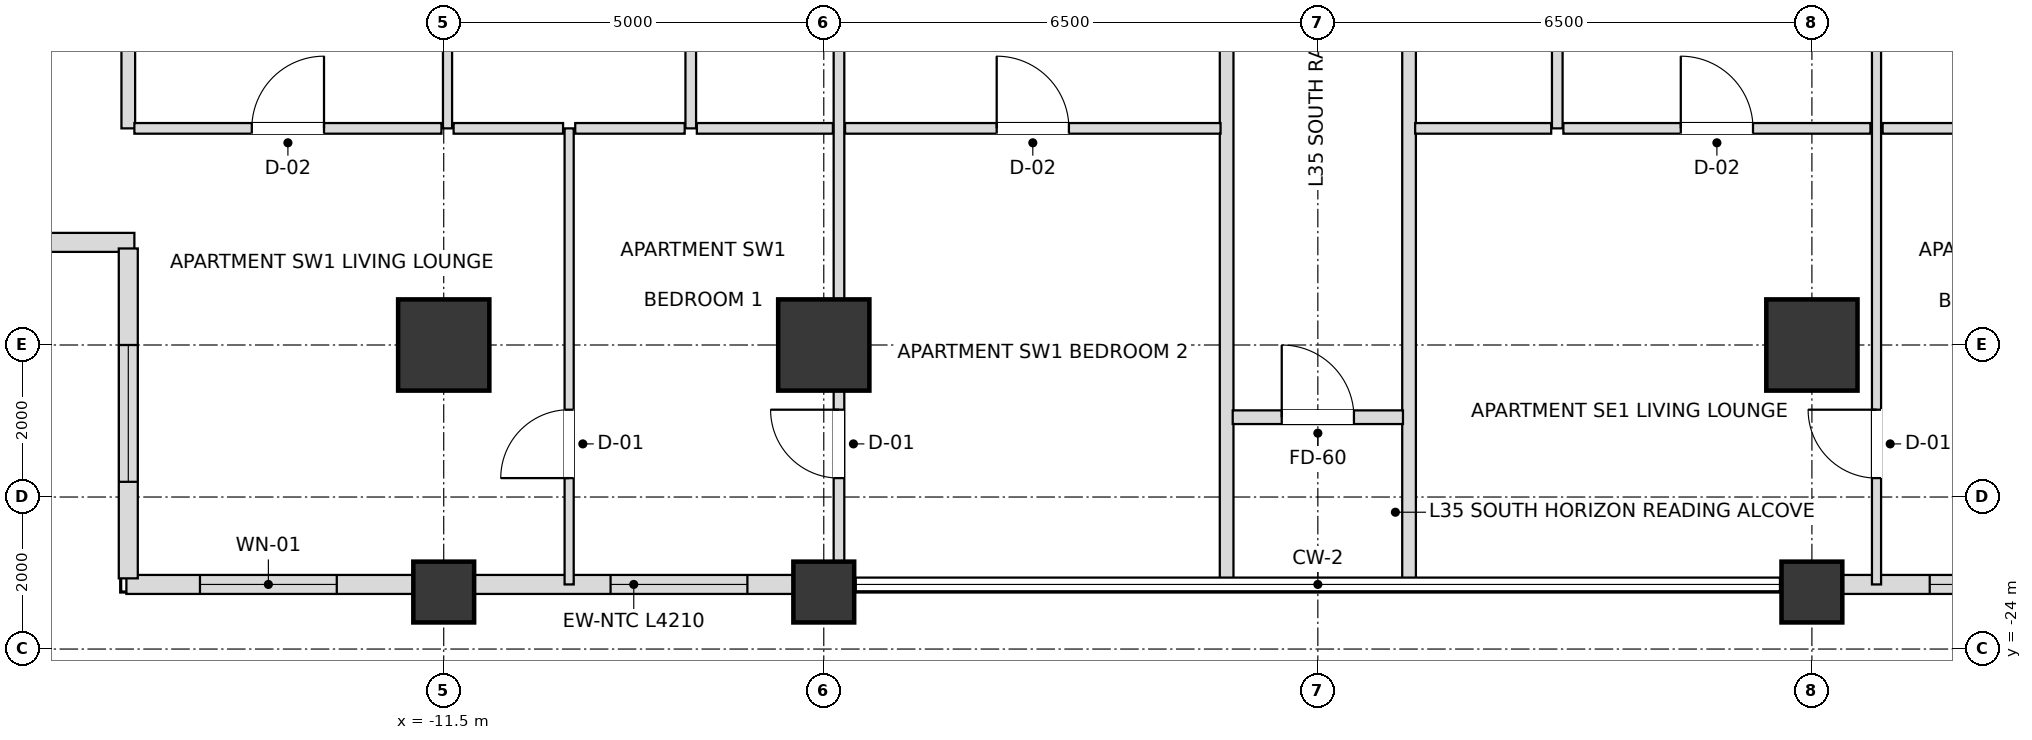
"""IFC4 building model, lengths in metres.
Left out: names, types, materials, properties, quantities, classifications, styles, units other than length and angle.
Written with IfcOpenShell. Run it as: python <this file> out.ifc"""

import sys

from ifc_helpers import new_model, si_unit, direction, frame, frame_2d, origin, origin_2d, place, context, subcontext, project, spatial, rectangle, extrude, element, fill, save


model = new_model("IFC4")
c1 = context("Model", 3, precision=1e-05, world=origin(), true_north=direction((0.0, 1.0)))
c2 = subcontext(c1, "Body", "Model", "MODEL_VIEW")
j1 = project(units=[si_unit("LENGTHUNIT", "METRE"), si_unit("PLANEANGLEUNIT", "RADIAN")], contexts=[c1])
p1 = place(None, origin())
s1 = spatial("IfcSite", under=j1, at=p1, CompositionType="ELEMENT")
p2 = place(p1, origin())
s2 = spatial("IfcBuilding", under=s1, at=p2, CompositionType="ELEMENT")
p3 = place(p2, frame((0.0, 0.0, 140.4)))
s3 = spatial("IfcBuildingStorey", under=s2, at=p3, CompositionType="ELEMENT", Elevation=140.4)
for number, where, z_axis, x_axis in (
    (1, (-11.5, -20.0, 0.0), (0.0, 0.0, 1.0), (1.0, 0.0, 0.0)),
    (2, (-6.5, -20.0, 0.0), (0.0, 0.0, 1.0), (1.0, 0.0, 0.0)),
    (3, (6.5, -20.0, 0.0), (0.0, 0.0, 1.0), (1.0, 0.0, 0.0)),
):
    element("IfcColumn", number, at=place(p3, frame(where, z_axis=z_axis, x_axis=x_axis)), inside=s3, PredefinedType="USERDEFINED", context=c2, shape_type="SweptSolid", body=[
        extrude(rectangle(XDim=1.2, YDim=1.2, at=origin_2d()), origin(), (0.0, 0.0, 1.0), 3.6),
    ])
for number, where, z_axis, x_axis in (
    (4, (-11.5, -23.25, 0.0), (0.0, 0.0, 1.0), (1.0, 0.0, 0.0)),
    (5, (-6.5, -23.25, 0.0), (0.0, 0.0, 1.0), (1.0, 0.0, 0.0)),
    (6, (6.5, -23.25, 0.0), (0.0, 0.0, 1.0), (1.0, 0.0, 0.0)),
):
    element("IfcColumn", number, at=place(p3, frame(where, z_axis=z_axis, x_axis=x_axis)), inside=s3, PredefinedType="COLUMN", context=c2, shape_type="SweptSolid", body=[
        extrude(rectangle(XDim=0.8, YDim=0.8, at=origin_2d()), origin(), (0.0, 0.0, 1.0), 3.6),
    ])
p4 = place(p3, frame((-15.675, -23.15, 0.0), z_axis=(0.0, 0.0, 1.0), x_axis=(1.0, 0.0, 0.0)))
e7 = element("IfcWall", 7, at=p4, inside=s3, PredefinedType="SOLIDWALL", context=c2, shape_type="SweptSolid", body=[
    extrude(rectangle(XDim=3.78, YDim=0.25, at=frame_2d((1.89, 0.0))), origin(), (0.0, 0.0, 1.0), 2.736),
])
p5 = place(p4, frame((0.968, 0.0, 0.72)))
e8 = element("IfcOpeningElement", 8, at=p5, cuts=e7, PredefinedType="OPENING", context=c2, shape_type="SweptSolid", body=[
    extrude(rectangle(XDim=1.8, YDim=1.68, at=frame_2d((0.9, 0.84))), frame((0.0, 0.135, 0.0), z_axis=(0.0, -1.0, 0.0), x_axis=(1.0, 0.0, 0.0)), (0.0, 0.0, 1.0), 0.27),
])
p6 = place(p3, frame((-11.105, -23.15, 0.0), z_axis=(0.0, 0.0, 1.0), x_axis=(1.0, 0.0, 0.0)))
e9 = element("IfcWall", 9, at=p6, inside=s3, PredefinedType="SOLIDWALL", context=c2, shape_type="SweptSolid", body=[
    extrude(rectangle(XDim=4.21, YDim=0.25, at=frame_2d((2.105, 0.0))), origin(), (0.0, 0.0, 1.0), 2.736),
])
p7 = place(p6, frame((1.8, 0.0, 0.72)))
e10 = element("IfcOpeningElement", 10, at=p7, cuts=e9, PredefinedType="OPENING", context=c2, shape_type="SweptSolid", body=[
    extrude(rectangle(XDim=1.8, YDim=1.68, at=frame_2d((0.9, 0.84))), frame((0.0, 0.135, 0.0), z_axis=(0.0, -1.0, 0.0), x_axis=(1.0, 0.0, 0.0)), (0.0, 0.0, 1.0), 0.27),
])
p8 = place(p3, frame((6.895, -23.15, 0.0), z_axis=(0.0, 0.0, 1.0), x_axis=(1.0, 0.0, 0.0)))
e11 = element("IfcWall", 11, at=p8, inside=s3, PredefinedType="SOLIDWALL", context=c2, shape_type="SweptSolid", body=[
    extrude(rectangle(XDim=4.21, YDim=0.25, at=frame_2d((2.105, 0.0))), origin(), (0.0, 0.0, 1.0), 2.736),
])
p9 = place(p8, frame((1.155, 0.0, 0.72)))
e12 = element("IfcOpeningElement", 12, at=p9, cuts=e11, PredefinedType="OPENING", context=c2, shape_type="SweptSolid", body=[
    extrude(rectangle(XDim=1.8, YDim=1.68, at=frame_2d((0.9, 0.84))), frame((0.0, 0.135, 0.0), z_axis=(0.0, -1.0, 0.0), x_axis=(1.0, 0.0, 0.0)), (0.0, 0.0, 1.0), 0.27),
])
p10 = place(p3, frame((-20.23, -18.65, 0.0), z_axis=(0.0, 0.0, 1.0), x_axis=(1.0, 0.0, 0.0)))
e13 = element("IfcWall", 13, at=p10, inside=s3, PredefinedType="SOLIDWALL", context=c2, shape_type="SweptSolid", body=[
    extrude(rectangle(XDim=4.66, YDim=0.25, at=frame_2d((2.33, 0.0))), origin(), (0.0, 0.0, 1.0), 2.736),
])
p11 = place(p10, frame((1.43, 0.0, 0.72)))
e14 = element("IfcOpeningElement", 14, at=p11, cuts=e13, PredefinedType="OPENING", context=c2, shape_type="SweptSolid", body=[
    extrude(rectangle(XDim=1.8, YDim=1.68, at=frame_2d((0.9, 0.84))), frame((0.0, 0.135, 0.0), z_axis=(0.0, -1.0, 0.0), x_axis=(1.0, 0.0, 0.0)), (0.0, 0.0, 1.0), 0.27),
])
p12 = place(p3, frame((-15.65, -18.73, 0.0), z_axis=(0.0, 0.0, 1.0), x_axis=(0.0, -1.0, 0.0)))
e15 = element("IfcWall", 15, at=p12, inside=s3, PredefinedType="SOLIDWALL", context=c2, shape_type="SweptSolid", body=[
    extrude(rectangle(XDim=4.34, YDim=0.25, at=frame_2d((2.17, 0.0))), origin(), (0.0, 0.0, 1.0), 2.736),
])
p13 = place(p12, frame((1.27, 0.0, 0.72)))
e16 = element("IfcOpeningElement", 16, at=p13, cuts=e15, PredefinedType="OPENING", context=c2, shape_type="SweptSolid", body=[
    extrude(rectangle(XDim=1.8, YDim=1.68, at=frame_2d((0.9, 0.84))), frame((0.0, 0.135, 0.0), z_axis=(0.0, -1.0, 0.0), x_axis=(1.0, 0.0, 0.0)), (0.0, 0.0, 1.0), 0.27),
])
p14 = place(p3, frame((-15.65, -17.15, 0.0), z_axis=(0.0, 0.0, 1.0), x_axis=(0.0, 1.0, 0.0)))
e17 = element("IfcWall", 17, at=p14, inside=s3, PredefinedType="PARTITIONING", context=c2, shape_type="SweptSolid", body=[
    extrude(rectangle(XDim=7.35, YDim=0.18, at=frame_2d((3.675, 0.0))), origin(), (0.0, 0.0, 1.0), 2.736),
])
p15 = place(p3, frame((-11.45, -17.15, 0.0), z_axis=(0.0, 0.0, 1.0), x_axis=(0.0, 1.0, 0.0)))
e18 = element("IfcWall", 18, at=p15, inside=s3, PredefinedType="PARTITIONING", context=c2, shape_type="SweptSolid", body=[
    extrude(rectangle(XDim=7.35, YDim=0.12, at=frame_2d((3.675, 0.0))), origin(), (0.0, 0.0, 1.0), 2.736),
])
p16 = place(p15, frame((2.687, 0.0, 0.0)))
e19 = element("IfcOpeningElement", 19, at=p16, cuts=e18, PredefinedType="OPENING", context=c2, shape_type="SweptSolid", body=[
    extrude(rectangle(XDim=0.95, YDim=2.1, at=frame_2d((0.475, 1.05))), frame((0.0, 0.07, 0.0), z_axis=(0.0, -1.0, 0.0), x_axis=(1.0, 0.0, 0.0)), (0.0, 0.0, 1.0), 0.14),
])
p17 = place(p3, frame((-9.85, -23.15, 0.0), z_axis=(0.0, 0.0, 1.0), x_axis=(0.0, 1.0, 0.0)))
e20 = element("IfcWall", 20, at=p17, inside=s3, PredefinedType="PARTITIONING", context=c2, shape_type="SweptSolid", body=[
    extrude(rectangle(XDim=6.0, YDim=0.12, at=frame_2d((3.0, 0.0))), origin(), (0.0, 0.0, 1.0), 2.816),
])
p18 = place(p17, frame((1.399, 0.0, 0.0)))
e21 = element("IfcOpeningElement", 21, at=p18, cuts=e20, PredefinedType="OPENING", context=c2, shape_type="SweptSolid", body=[
    extrude(rectangle(XDim=0.9, YDim=2.1, at=frame_2d((0.45, 1.05))), frame((0.0, 0.07, 0.0), z_axis=(0.0, -1.0, 0.0), x_axis=(1.0, 0.0, 0.0)), (0.0, 0.0, 1.0), 0.14),
])
p19 = place(p3, frame((-8.25, -17.15, 0.0), z_axis=(0.0, 0.0, 1.0), x_axis=(0.0, 1.0, 0.0)))
e22 = element("IfcWall", 22, at=p19, inside=s3, PredefinedType="PARTITIONING", context=c2, shape_type="SweptSolid", body=[
    extrude(rectangle(XDim=7.35, YDim=0.14, at=frame_2d((3.675, 0.0))), origin(), (0.0, 0.0, 1.0), 2.816),
])
p20 = place(p19, frame((3.23, 0.0, 0.0)))
e23 = element("IfcOpeningElement", 23, at=p20, cuts=e22, PredefinedType="OPENING", context=c2, shape_type="SweptSolid", body=[
    extrude(rectangle(XDim=0.9, YDim=2.1, at=frame_2d((0.45, 1.05))), frame((0.0, 0.08, 0.0), z_axis=(0.0, -1.0, 0.0), x_axis=(1.0, 0.0, 0.0)), (0.0, 0.0, 1.0), 0.16),
])
p21 = place(p3, frame((-6.3, -23.15, 0.0), z_axis=(0.0, 0.0, 1.0), x_axis=(0.0, 1.0, 0.0)))
e24 = element("IfcWall", 24, at=p21, inside=s3, PredefinedType="PARTITIONING", context=c2, shape_type="SweptSolid", body=[
    extrude(rectangle(XDim=13.35, YDim=0.14, at=frame_2d((6.675, 0.0))), origin(), (0.0, 0.0, 1.0), 2.816),
])
p22 = place(p21, frame((1.399, 0.0, 0.0)))
e25 = element("IfcOpeningElement", 25, at=p22, cuts=e24, PredefinedType="OPENING", context=c2, shape_type="SweptSolid", body=[
    extrude(rectangle(XDim=0.9, YDim=2.1, at=frame_2d((0.45, 1.05))), frame((0.0, 0.08, 0.0), z_axis=(0.0, -1.0, 0.0), x_axis=(1.0, 0.0, 0.0)), (0.0, 0.0, 1.0), 0.16),
])
for number, where, z_axis, x_axis in (
    (26, (-1.2, -23.15, 0.0), (0.0, 0.0, 1.0), (0.0, 1.0, 0.0)),
    (27, (1.2, -23.15, 0.0), (0.0, 0.0, 1.0), (0.0, 1.0, 0.0)),
):
    element("IfcWall", number, at=place(p3, frame(where, z_axis=z_axis, x_axis=x_axis)), inside=s3, PredefinedType="PARTITIONING", context=c2, shape_type="SweptSolid", body=[
        extrude(rectangle(XDim=13.35, YDim=0.18, at=frame_2d((6.675, 0.0))), origin(), (0.0, 0.0, 1.0), 2.816),
    ])
p23 = place(p3, frame((3.15, -17.15, 0.0), z_axis=(0.0, 0.0, 1.0), x_axis=(0.0, 1.0, 0.0)))
e28 = element("IfcWall", 28, at=p23, inside=s3, PredefinedType="PARTITIONING", context=c2, shape_type="SweptSolid", body=[
    extrude(rectangle(XDim=7.35, YDim=0.14, at=frame_2d((3.675, 0.0))), origin(), (0.0, 0.0, 1.0), 3.38),
])
p24 = place(p23, frame((3.23, 0.0, 0.0)))
e29 = element("IfcOpeningElement", 29, at=p24, cuts=e28, PredefinedType="OPENING", context=c2, shape_type="SweptSolid", body=[
    extrude(rectangle(XDim=0.9, YDim=2.1, at=frame_2d((0.45, 1.05))), frame((0.0, 0.08, 0.0), z_axis=(0.0, -1.0, 0.0), x_axis=(1.0, 0.0, 0.0)), (0.0, 0.0, 1.0), 0.16),
])
p25 = place(p3, frame((7.35, -23.15, 0.0), z_axis=(0.0, 0.0, 1.0), x_axis=(0.0, 1.0, 0.0)))
e30 = element("IfcWall", 30, at=p25, inside=s3, PredefinedType="PARTITIONING", context=c2, shape_type="SweptSolid", body=[
    extrude(rectangle(XDim=13.35, YDim=0.12, at=frame_2d((6.675, 0.0))), origin(), (0.0, 0.0, 1.0), 2.816),
])
p26 = place(p25, frame((9.205, 0.0, 0.0)))
e31 = element("IfcOpeningElement", 31, at=p26, cuts=e30, PredefinedType="OPENING", context=c2, shape_type="SweptSolid", body=[
    extrude(rectangle(XDim=0.95, YDim=2.1, at=frame_2d((0.475, 1.05))), frame((0.0, 0.07, 0.0), z_axis=(0.0, -1.0, 0.0), x_axis=(1.0, 0.0, 0.0)), (0.0, 0.0, 1.0), 0.14),
])
p27 = place(p25, frame((1.399, 0.0, 0.0)))
e32 = element("IfcOpeningElement", 32, at=p27, cuts=e30, PredefinedType="OPENING", context=c2, shape_type="SweptSolid", body=[
    extrude(rectangle(XDim=0.9, YDim=2.1, at=frame_2d((0.45, 1.05))), frame((0.0, 0.07, 0.0), z_axis=(0.0, -1.0, 0.0), x_axis=(1.0, 0.0, 0.0)), (0.0, 0.0, 1.0), 0.14),
])
p28 = place(p3, frame((-1.12, -20.95, 0.0), z_axis=(0.0, 0.0, 1.0), x_axis=(1.0, 0.0, 0.0)))
e33 = element("IfcWall", 33, at=p28, inside=s3, PredefinedType="PARTITIONING", context=c2, shape_type="SweptSolid", body=[
    extrude(rectangle(XDim=2.24, YDim=0.18, at=frame_2d((1.12, 0.0))), origin(), (0.0, 0.0, 1.0), 3.38),
])
p29 = place(p28, frame((0.645, 0.0, 0.0)))
e34 = element("IfcOpeningElement", 34, at=p29, cuts=e33, PredefinedType="OPENING", context=c2, shape_type="SweptSolid", body=[
    extrude(rectangle(XDim=0.95, YDim=2.15, at=frame_2d((0.475, 1.075))), frame((0.0, 0.1, 0.0), z_axis=(0.0, -1.0, 0.0), x_axis=(1.0, 0.0, 0.0)), (0.0, 0.0, 1.0), 0.2),
])
p30 = place(p3, frame((-15.57, -17.15, 0.0), z_axis=(0.0, 0.0, 1.0), x_axis=(1.0, 0.0, 0.0)))
e35 = element("IfcWall", 35, at=p30, inside=s3, PredefinedType="PARTITIONING", context=c2, shape_type="SweptSolid", body=[
    extrude(rectangle(XDim=4.04, YDim=0.14, at=frame_2d((2.02, 0.0))), origin(), (0.0, 0.0, 1.0), 2.736),
])
p31 = place(p30, frame((1.545, 0.0, 0.0)))
e36 = element("IfcOpeningElement", 36, at=p31, cuts=e35, PredefinedType="OPENING", context=c2, shape_type="SweptSolid", body=[
    extrude(rectangle(XDim=0.95, YDim=2.1, at=frame_2d((0.475, 1.05))), frame((0.0, 0.08, 0.0), z_axis=(0.0, -1.0, 0.0), x_axis=(1.0, 0.0, 0.0)), (0.0, 0.0, 1.0), 0.16),
])
p32 = place(p3, frame((-11.37, -17.15, 0.0), z_axis=(0.0, 0.0, 1.0), x_axis=(1.0, 0.0, 0.0)))
e37 = element("IfcWall", 37, at=p32, inside=s3, PredefinedType="PARTITIONING", context=c2, shape_type="SweptSolid", body=[
    extrude(rectangle(XDim=1.44, YDim=0.14, at=frame_2d((0.72, 0.0))), origin(), (0.0, 0.0, 1.0), 3.38),
])
p33 = place(p3, frame((-9.77, -17.15, 0.0), z_axis=(0.0, 0.0, 1.0), x_axis=(1.0, 0.0, 0.0)))
e38 = element("IfcWall", 38, at=p33, inside=s3, PredefinedType="PARTITIONING", context=c2, shape_type="SweptSolid", body=[
    extrude(rectangle(XDim=1.44, YDim=0.14, at=frame_2d((0.72, 0.0))), origin(), (0.0, 0.0, 1.0), 3.38),
])
p34 = place(p3, frame((-8.17, -17.15, 0.0), z_axis=(0.0, 0.0, 1.0), x_axis=(1.0, 0.0, 0.0)))
e39 = element("IfcWall", 39, at=p34, inside=s3, PredefinedType="PARTITIONING", context=c2, shape_type="SweptSolid", body=[
    extrude(rectangle(XDim=1.79, YDim=0.14, at=frame_2d((0.895, 0.0))), origin(), (0.0, 0.0, 1.0), 2.816),
])
p35 = place(p3, frame((-6.22, -17.15, 0.0), z_axis=(0.0, 0.0, 1.0), x_axis=(1.0, 0.0, 0.0)))
e40 = element("IfcWall", 40, at=p35, inside=s3, PredefinedType="PARTITIONING", context=c2, shape_type="SweptSolid", body=[
    extrude(rectangle(XDim=4.94, YDim=0.14, at=frame_2d((2.47, 0.0))), origin(), (0.0, 0.0, 1.0), 3.38),
])
p36 = place(p35, frame((1.995, 0.0, 0.0)))
e41 = element("IfcOpeningElement", 41, at=p36, cuts=e40, PredefinedType="OPENING", context=c2, shape_type="SweptSolid", body=[
    extrude(rectangle(XDim=0.95, YDim=2.1, at=frame_2d((0.475, 1.05))), frame((0.0, 0.08, 0.0), z_axis=(0.0, -1.0, 0.0), x_axis=(1.0, 0.0, 0.0)), (0.0, 0.0, 1.0), 0.16),
])
p37 = place(p3, frame((1.28, -17.15, 0.0), z_axis=(0.0, 0.0, 1.0), x_axis=(1.0, 0.0, 0.0)))
e42 = element("IfcWall", 42, at=p37, inside=s3, PredefinedType="PARTITIONING", context=c2, shape_type="SweptSolid", body=[
    extrude(rectangle(XDim=1.79, YDim=0.14, at=frame_2d((0.895, 0.0))), origin(), (0.0, 0.0, 1.0), 3.38),
])
p38 = place(p3, frame((3.23, -17.15, 0.0), z_axis=(0.0, 0.0, 1.0), x_axis=(1.0, 0.0, 0.0)))
e43 = element("IfcWall", 43, at=p38, inside=s3, PredefinedType="PARTITIONING", context=c2, shape_type="SweptSolid", body=[
    extrude(rectangle(XDim=4.04, YDim=0.14, at=frame_2d((2.02, 0.0))), origin(), (0.0, 0.0, 1.0), 2.816),
])
p39 = place(p38, frame((1.545, 0.0, 0.0)))
e44 = element("IfcOpeningElement", 44, at=p39, cuts=e43, PredefinedType="OPENING", context=c2, shape_type="SweptSolid", body=[
    extrude(rectangle(XDim=0.95, YDim=2.1, at=frame_2d((0.475, 1.05))), frame((0.0, 0.08, 0.0), z_axis=(0.0, -1.0, 0.0), x_axis=(1.0, 0.0, 0.0)), (0.0, 0.0, 1.0), 0.16),
])
p40 = place(p3, frame((7.43, -17.15, 0.0), z_axis=(0.0, 0.0, 1.0), x_axis=(1.0, 0.0, 0.0)))
e45 = element("IfcWall", 45, at=p40, inside=s3, PredefinedType="PARTITIONING", context=c2, shape_type="SweptSolid", body=[
    extrude(rectangle(XDim=3.04, YDim=0.14, at=frame_2d((1.52, 0.0))), origin(), (0.0, 0.0, 1.0), 3.38),
])
p41 = place(p5, origin())
e46 = element("IfcWindow", 46, at=p41, inside=s3, PartitioningType="SINGLE_PANEL", PredefinedType="WINDOW", context=c2, shape_type="SweptSolid", body=[
    extrude(rectangle(XDim=1.8, YDim=1.68, at=frame_2d((0.9, 0.84))), frame((0.0, 0.03, 0.0), z_axis=(0.0, -1.0, 0.0), x_axis=(1.0, 0.0, 0.0)), (0.0, 0.0, 1.0), 0.06),
])
fill(e8, e46)
p42 = place(p7, origin())
e47 = element("IfcWindow", 47, at=p42, inside=s3, PartitioningType="SINGLE_PANEL", PredefinedType="WINDOW", context=c2, shape_type="SweptSolid", body=[
    extrude(rectangle(XDim=1.8, YDim=1.68, at=frame_2d((0.9, 0.84))), frame((0.0, 0.03, 0.0), z_axis=(0.0, -1.0, 0.0), x_axis=(1.0, 0.0, 0.0)), (0.0, 0.0, 1.0), 0.06),
])
fill(e10, e47)
p43 = place(p9, origin())
e48 = element("IfcWindow", 48, at=p43, inside=s3, PartitioningType="SINGLE_PANEL", PredefinedType="WINDOW", context=c2, shape_type="SweptSolid", body=[
    extrude(rectangle(XDim=1.8, YDim=1.68, at=frame_2d((0.9, 0.84))), frame((0.0, 0.03, 0.0), z_axis=(0.0, -1.0, 0.0), x_axis=(1.0, 0.0, 0.0)), (0.0, 0.0, 1.0), 0.06),
])
fill(e12, e48)
p44 = place(p13, origin())
e49 = element("IfcWindow", 49, at=p44, inside=s3, PartitioningType="SINGLE_PANEL", PredefinedType="WINDOW", context=c2, shape_type="SweptSolid", body=[
    extrude(rectangle(XDim=1.8, YDim=1.68, at=frame_2d((0.9, 0.84))), frame((0.0, 0.03, 0.0), z_axis=(0.0, -1.0, 0.0), x_axis=(1.0, 0.0, 0.0)), (0.0, 0.0, 1.0), 0.06),
])
fill(e16, e49)
p45 = place(p29, origin())
e50 = element("IfcDoor", 50, at=p45, inside=s3, OperationType="SINGLE_SWING_LEFT", PredefinedType="DOOR", context=c2, shape_type="SweptSolid", body=[
    extrude(rectangle(XDim=0.95, YDim=2.15, at=frame_2d((0.475, 1.075))), frame((0.0, 0.025, 0.0), z_axis=(0.0, -1.0, 0.0), x_axis=(1.0, 0.0, 0.0)), (0.0, 0.0, 1.0), 0.05),
])
fill(e34, e50)
p46 = place(p36, origin())
e51 = element("IfcDoor", 51, at=p46, inside=s3, OperationType="SINGLE_SWING_LEFT", PredefinedType="DOOR", context=c2, shape_type="SweptSolid", body=[
    extrude(rectangle(XDim=0.95, YDim=2.1, at=frame_2d((0.475, 1.05))), frame((0.0, 0.025, 0.0), z_axis=(0.0, -1.0, 0.0), x_axis=(1.0, 0.0, 0.0)), (0.0, 0.0, 1.0), 0.05),
])
fill(e41, e51)
p47 = place(p31, origin())
e52 = element("IfcDoor", 52, at=p47, inside=s3, OperationType="SINGLE_SWING_RIGHT", PredefinedType="DOOR", context=c2, shape_type="SweptSolid", body=[
    extrude(rectangle(XDim=0.95, YDim=2.1, at=frame_2d((0.475, 1.05))), frame((0.0, 0.025, 0.0), z_axis=(0.0, -1.0, 0.0), x_axis=(1.0, 0.0, 0.0)), (0.0, 0.0, 1.0), 0.05),
])
fill(e36, e52)
p48 = place(p18, origin())
e53 = element("IfcDoor", 53, at=p48, inside=s3, OperationType="SINGLE_SWING_LEFT", PredefinedType="DOOR", context=c2, shape_type="SweptSolid", body=[
    extrude(rectangle(XDim=0.9, YDim=2.1, at=frame_2d((0.45, 1.05))), frame((0.0, 0.025, 0.0), z_axis=(0.0, -1.0, 0.0), x_axis=(1.0, 0.0, 0.0)), (0.0, 0.0, 1.0), 0.05),
])
fill(e21, e53)
p49 = place(p22, origin())
e54 = element("IfcDoor", 54, at=p49, inside=s3, OperationType="SINGLE_SWING_RIGHT", PredefinedType="DOOR", context=c2, shape_type="SweptSolid", body=[
    extrude(rectangle(XDim=0.9, YDim=2.1, at=frame_2d((0.45, 1.05))), frame((0.0, 0.025, 0.0), z_axis=(0.0, -1.0, 0.0), x_axis=(1.0, 0.0, 0.0)), (0.0, 0.0, 1.0), 0.05),
])
fill(e25, e54)
p50 = place(p39, origin())
e55 = element("IfcDoor", 55, at=p50, inside=s3, OperationType="SINGLE_SWING_LEFT", PredefinedType="DOOR", context=c2, shape_type="SweptSolid", body=[
    extrude(rectangle(XDim=0.95, YDim=2.1, at=frame_2d((0.475, 1.05))), frame((0.0, 0.025, 0.0), z_axis=(0.0, -1.0, 0.0), x_axis=(1.0, 0.0, 0.0)), (0.0, 0.0, 1.0), 0.05),
])
fill(e44, e55)
p51 = place(p27, origin())
e56 = element("IfcDoor", 56, at=p51, inside=s3, OperationType="SINGLE_SWING_RIGHT", PredefinedType="DOOR", context=c2, shape_type="SweptSolid", body=[
    extrude(rectangle(XDim=0.9, YDim=2.1, at=frame_2d((0.45, 1.05))), frame((0.0, 0.025, 0.0), z_axis=(0.0, -1.0, 0.0), x_axis=(1.0, 0.0, 0.0)), (0.0, 0.0, 1.0), 0.05),
])
fill(e32, e56)
save(model, sys.argv[1])
